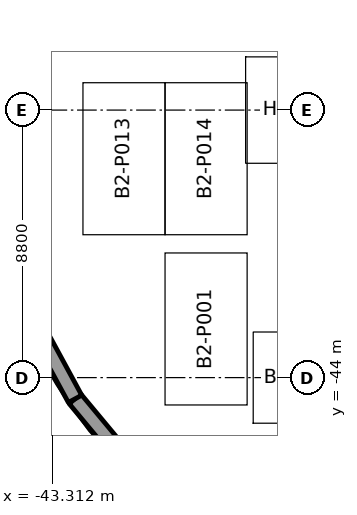
"""IFC4 building model, lengths in metres.
Left out: names, types, materials, properties, quantities, classifications, styles, units other than length and angle.
Written with IfcOpenShell. Run it as: python <this file> out.ifc"""

import sys

from ifc_helpers import new_model, si_unit, direction, frame, frame_2d, origin, place, context, subcontext, project, spatial, rectangle, extrude, element, save


model = new_model("IFC4")
c1 = context("Model", 3, precision=1e-05, world=origin(), true_north=direction((0.0, 1.0)))
c2 = subcontext(c1, "Body", "Model", "MODEL_VIEW")
j1 = project(units=[si_unit("LENGTHUNIT", "METRE"), si_unit("PLANEANGLEUNIT", "RADIAN")], contexts=[c1])
p1 = place(None, origin())
s1 = spatial("IfcSite", under=j1, at=p1, CompositionType="ELEMENT")
p2 = place(p1, origin())
s2 = spatial("IfcBuilding", under=s1, at=p2, CompositionType="ELEMENT")
p3 = place(p2, frame((0.0, 0.0, -9.0)))
s3 = spatial("IfcBuildingStorey", under=s2, at=p3, CompositionType="ELEMENT", Elevation=-9.0)
p4 = place(p3, frame((-40.853, -46.752, 0.0), z_axis=(0.0, 0.0, 1.0), x_axis=(-0.63937488944, 0.768895149388, 0.0)))
e1 = element("IfcWall", 1, at=p4, inside=s3, PredefinedType="SOLIDWALL", context=c2, shape_type="SweptSolid", body=[
    extrude(rectangle(XDim=2.671, YDim=0.5, at=frame_2d((1.335, 0.0))), origin(), (0.0, 0.0, 1.0), 4.5),
])
p5 = place(p3, frame((-42.561, -44.699, 0.0), z_axis=(0.0, 0.0, 1.0), x_axis=(-0.477048002242, 0.878877240323, 0.0)))
e2 = element("IfcWall", 2, at=p5, inside=s3, PredefinedType="SOLIDWALL", context=c2, shape_type="SweptSolid", body=[
    extrude(rectangle(XDim=4.791, YDim=0.5, at=frame_2d((2.396, 0.0))), origin(), (0.0, 0.0, 1.0), 4.5),
])
save(model, sys.argv[1])
